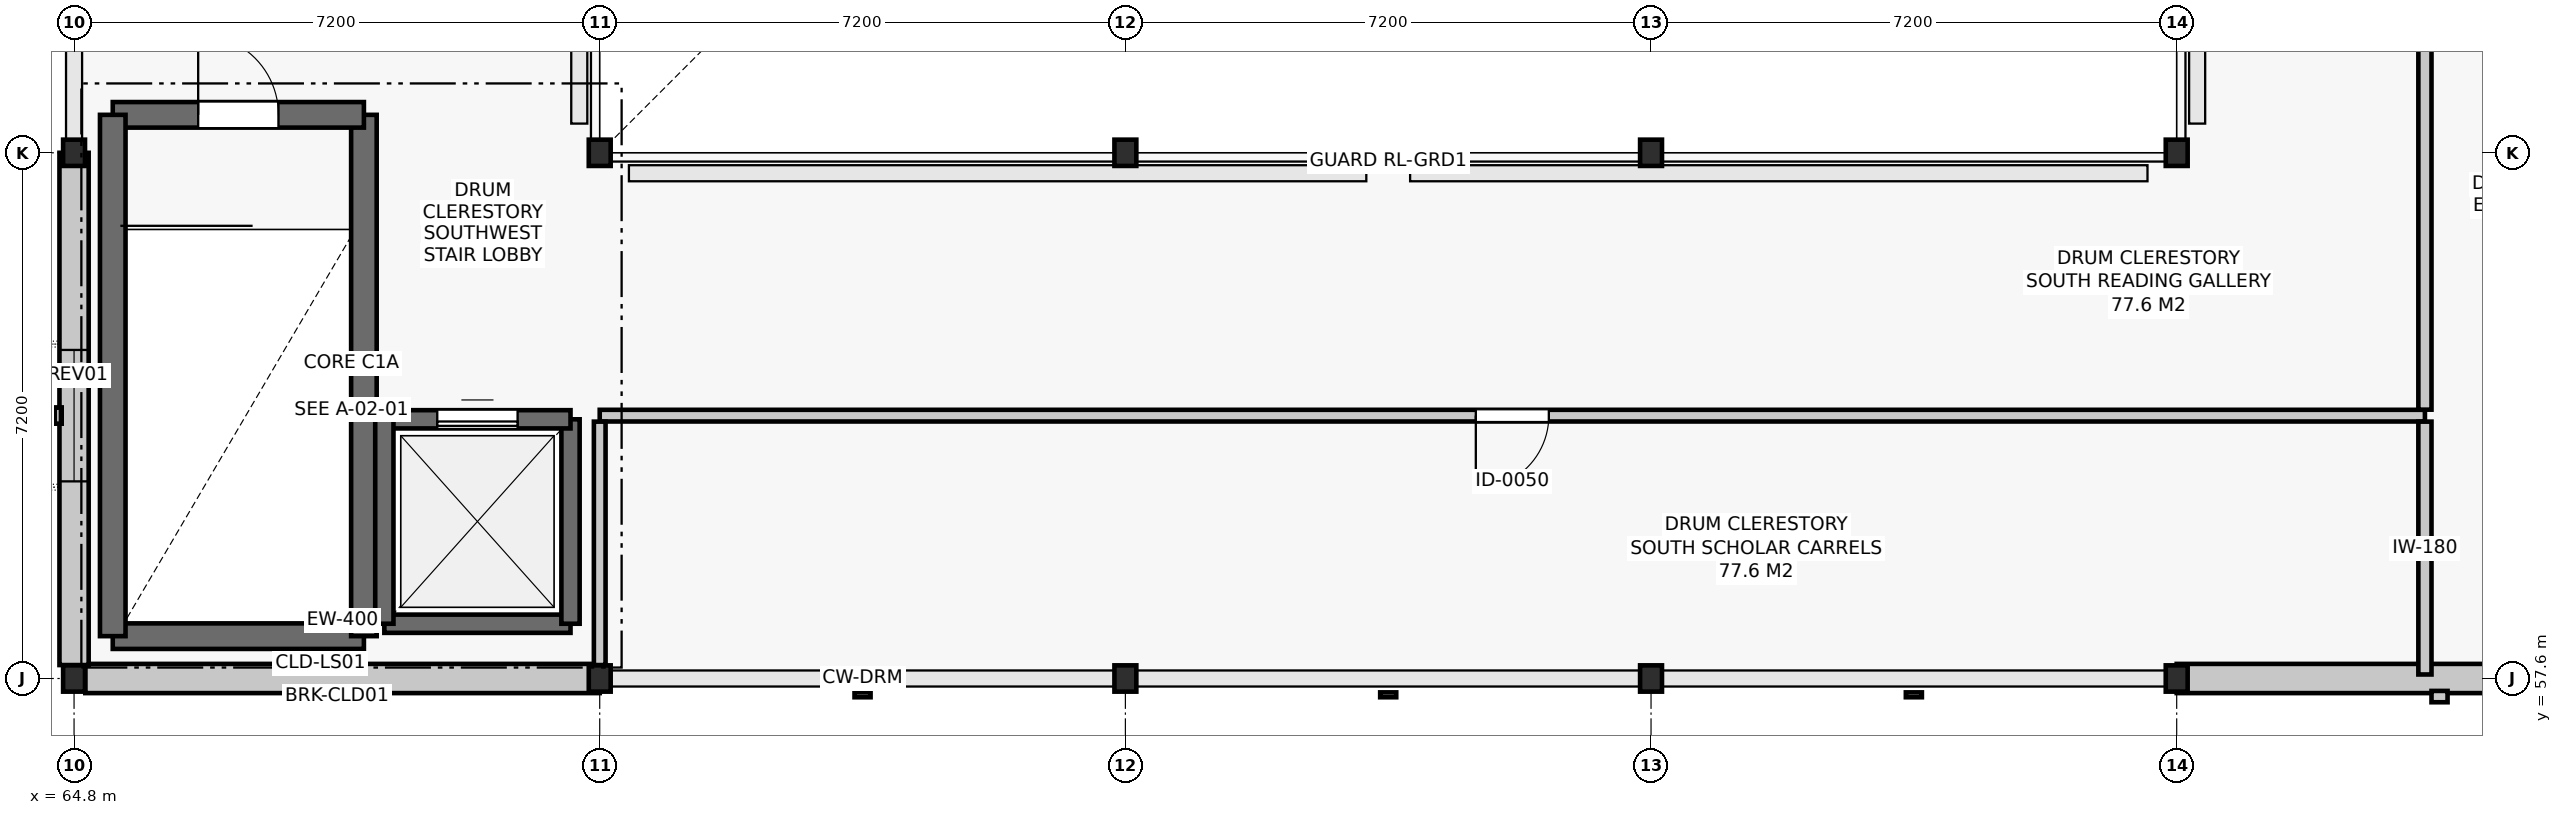
"""IFC4 building model, lengths in metres.
Left out: names, types, materials, properties, quantities, classifications, styles, units other than length and angle.
Written with IfcOpenShell. Run it as: python <this file> out.ifc"""

import sys

from ifc_helpers import new_model, si_unit, direction, frame, frame_2d, origin, origin_2d, place, context, subcontext, project, spatial, rectangle, i_section, extrude, element, fill, save


model = new_model("IFC4")
c1 = context("Model", 3, precision=1e-05, world=origin(), true_north=direction((0.0, 1.0)))
c2 = subcontext(c1, "Body", "Model", "MODEL_VIEW")
j1 = project(units=[si_unit("LENGTHUNIT", "METRE"), si_unit("PLANEANGLEUNIT", "RADIAN")], contexts=[c1])
p1 = place(None, origin())
s1 = spatial("IfcSite", under=j1, at=p1, CompositionType="ELEMENT")
p2 = place(p1, origin())
s2 = spatial("IfcBuilding", under=s1, at=p2, CompositionType="ELEMENT")
p3 = place(p2, frame((0.0, 0.0, 14.4)))
s3 = spatial("IfcBuildingStorey", under=s2, at=p3, CompositionType="ELEMENT", Elevation=14.4)
for number, where, z_axis, x_axis in (
    (1, (64.8, 57.6, 0.0), (0.0, 0.0, 1.0), (1.0, 0.0, 0.0)),
    (2, (64.8, 64.8, 0.0), (0.0, 0.0, 1.0), (1.0, 0.0, 0.0)),
    (3, (72.0, 57.6, 0.0), (0.0, 0.0, 1.0), (1.0, 0.0, 0.0)),
    (4, (72.0, 64.8, 0.0), (0.0, 0.0, 1.0), (1.0, 0.0, 0.0)),
    (5, (79.2, 57.6, 0.0), (0.0, 0.0, 1.0), (1.0, 0.0, 0.0)),
    (6, (79.2, 64.8, 0.0), (0.0, 0.0, 1.0), (1.0, 0.0, 0.0)),
    (7, (86.4, 57.6, 0.0), (0.0, 0.0, 1.0), (1.0, 0.0, 0.0)),
    (8, (86.4, 64.8, 0.0), (0.0, 0.0, 1.0), (1.0, 0.0, 0.0)),
    (9, (93.6, 57.6, 0.0), (0.0, 0.0, 1.0), (1.0, 0.0, 0.0)),
    (10, (93.6, 64.8, 0.0), (0.0, 0.0, 1.0), (1.0, 0.0, 0.0)),
):
    element("IfcColumn", number, at=place(p3, frame(where, z_axis=z_axis, x_axis=x_axis)), inside=s3, PredefinedType="COLUMN", context=c2, shape_type="SweptSolid", body=[
        extrude(i_section(OverallWidth=0.3, OverallDepth=0.36, WebThickness=0.012, FlangeThickness=0.022, FilletRadius=0.027, at=origin_2d()), origin(), (0.0, 0.0, 1.0), 4.2),
    ])
for number, where, z_axis, x_axis in (
    (11, (64.954, 57.6, 0.0), (0.0, 0.0, 1.0), (1.0, 0.0, 0.0)),
    (12, (93.6, 57.6, 0.0), (0.0, 0.0, 1.0), (1.0, 0.0, 0.0)),
):
    element("IfcWall", number, at=place(p3, frame(where, z_axis=z_axis, x_axis=x_axis)), inside=s3, PredefinedType="SOLIDWALL", context=c2, shape_type="SweptSolid", body=[
        extrude(rectangle(XDim=7.046, YDim=0.4, at=frame_2d((3.523, 0.0))), origin(), (0.0, 0.0, 1.0), 3.24),
    ])
p4 = place(p3, frame((64.8, 64.8, 0.0), z_axis=(0.0, 0.0, 1.0), x_axis=(0.0, -1.0, 0.0)))
e13 = element("IfcWall", 13, at=p4, inside=s3, PredefinedType="SOLIDWALL", context=c2, shape_type="SweptSolid", body=[
    extrude(rectangle(XDim=7.016, YDim=0.4, at=frame_2d((3.508, 0.0))), origin(), (0.0, 0.0, 1.0), 3.24),
])
p5 = place(p4, frame((2.7, 0.0, 0.95)))
e14 = element("IfcOpeningElement", 14, at=p5, cuts=e13, PredefinedType="OPENING", context=c2, shape_type="SweptSolid", body=[
    extrude(rectangle(XDim=1.8, YDim=2.05, at=frame_2d((0.9, 1.025))), frame((0.0, 0.212, 0.0), z_axis=(0.0, -1.0, 0.0), x_axis=(1.0, 0.0, 0.0)), (0.0, 0.0, 1.0), 0.424),
])
p6 = place(p3, frame((65.33, 58.18, 0.0), z_axis=(0.0, 0.0, 1.0), x_axis=(1.0, 0.0, 0.0)))
e15 = element("IfcWall", 15, at=p6, inside=s3, PredefinedType="SHEAR", context=c2, shape_type="SweptSolid", body=[
    extrude(rectangle(XDim=3.44, YDim=0.35, at=frame_2d((1.72, 0.0))), origin(), (0.0, 0.0, 1.0), 3.96),
])
p7 = place(p3, frame((68.77, 58.18, 0.0), z_axis=(0.0, 0.0, 1.0), x_axis=(0.0, 1.0, 0.0)))
e16 = element("IfcWall", 16, at=p7, inside=s3, PredefinedType="SHEAR", context=c2, shape_type="SweptSolid", body=[
    extrude(rectangle(XDim=7.14, YDim=0.35, at=frame_2d((3.57, 0.0))), origin(), (0.0, 0.0, 1.0), 3.96),
])
p8 = place(p3, frame((68.77, 65.32, 0.0), z_axis=(0.0, 0.0, 1.0), x_axis=(-1.0, 0.0, 0.0)))
e17 = element("IfcWall", 17, at=p8, inside=s3, PredefinedType="SHEAR", context=c2, shape_type="SweptSolid", body=[
    extrude(rectangle(XDim=3.44, YDim=0.35, at=frame_2d((1.72, 0.0))), origin(), (0.0, 0.0, 1.0), 3.96),
])
p9 = place(p8, frame((1.17, 0.0, 0.0)))
e18 = element("IfcOpeningElement", 18, at=p9, cuts=e17, PredefinedType="OPENING", context=c2, shape_type="SweptSolid", body=[
    extrude(rectangle(XDim=1.1, YDim=2.15, at=frame_2d((0.55, 1.075))), frame((0.0, 0.187, 0.0), z_axis=(0.0, -1.0, 0.0), x_axis=(1.0, 0.0, 0.0)), (0.0, 0.0, 1.0), 0.374),
])
p10 = place(p3, frame((65.33, 65.32, 0.0), z_axis=(0.0, 0.0, 1.0), x_axis=(0.0, -1.0, 0.0)))
e19 = element("IfcWall", 19, at=p10, inside=s3, PredefinedType="SHEAR", context=c2, shape_type="SweptSolid", body=[
    extrude(rectangle(XDim=7.14, YDim=0.35, at=frame_2d((3.57, 0.0))), origin(), (0.0, 0.0, 1.0), 3.96),
])
p11 = place(p3, frame((69.05, 58.35, 0.0), z_axis=(0.0, 0.0, 1.0), x_axis=(1.0, 0.0, 0.0)))
e20 = element("IfcWall", 20, at=p11, inside=s3, PredefinedType="SHEAR", context=c2, shape_type="SweptSolid", body=[
    extrude(rectangle(XDim=2.55, YDim=0.25, at=frame_2d((1.275, 0.0))), origin(), (0.0, 0.0, 1.0), 3.96),
])
p12 = place(p3, frame((71.6, 58.35, 0.0), z_axis=(0.0, 0.0, 1.0), x_axis=(0.0, 1.0, 0.0)))
e21 = element("IfcWall", 21, at=p12, inside=s3, PredefinedType="SHEAR", context=c2, shape_type="SweptSolid", body=[
    extrude(rectangle(XDim=2.8, YDim=0.25, at=frame_2d((1.4, 0.0))), origin(), (0.0, 0.0, 1.0), 3.96),
])
p13 = place(p3, frame((71.6, 61.15, 0.0), z_axis=(0.0, 0.0, 1.0), x_axis=(-1.0, 0.0, 0.0)))
e22 = element("IfcWall", 22, at=p13, inside=s3, PredefinedType="SHEAR", context=c2, shape_type="SweptSolid", body=[
    extrude(rectangle(XDim=2.55, YDim=0.25, at=frame_2d((1.275, 0.0))), origin(), (0.0, 0.0, 1.0), 3.96),
])
p14 = place(p13, frame((0.725, 0.0, 0.0)))
e23 = element("IfcOpeningElement", 23, at=p14, cuts=e22, PredefinedType="OPENING", context=c2, shape_type="SweptSolid", body=[
    extrude(rectangle(XDim=1.1, YDim=2.1, at=frame_2d((0.55, 1.05))), frame((0.0, 0.137, 0.0), z_axis=(0.0, -1.0, 0.0), x_axis=(1.0, 0.0, 0.0)), (0.0, 0.0, 1.0), 0.274),
])
p15 = place(p3, frame((69.05, 61.15, 0.0), z_axis=(0.0, 0.0, 1.0), x_axis=(0.0, -1.0, 0.0)))
e24 = element("IfcWall", 24, at=p15, inside=s3, PredefinedType="SHEAR", context=c2, shape_type="SweptSolid", body=[
    extrude(rectangle(XDim=2.8, YDim=0.25, at=frame_2d((1.4, 0.0))), origin(), (0.0, 0.0, 1.0), 3.96),
])
p16 = place(p3, frame((72.0, 61.2, 0.0), z_axis=(0.0, 0.0, 1.0), x_axis=(1.0, 0.0, 0.0)))
e25 = element("IfcWall", 25, at=p16, inside=s3, PredefinedType="PARTITIONING", context=c2, shape_type="SweptSolid", body=[
    extrude(rectangle(XDim=25.0, YDim=0.16, at=frame_2d((12.5, 0.0))), origin(), (0.0, 0.0, 1.0), 3.135),
])
p17 = place(p16, frame((12.0, 0.0, 0.0)))
e26 = element("IfcOpeningElement", 26, at=p17, cuts=e25, PredefinedType="OPENING", context=c2, shape_type="SweptSolid", body=[
    extrude(rectangle(XDim=1.0, YDim=2.15, at=frame_2d((0.5, 1.075))), frame((0.0, 0.092, 0.0), z_axis=(0.0, -1.0, 0.0), x_axis=(1.0, 0.0, 0.0)), (0.0, 0.0, 1.0), 0.184),
])
p18 = place(p3, frame((97.0, 57.655, 0.0), z_axis=(0.0, 0.0, 1.0), x_axis=(0.0, 1.0, 0.0)))
e27 = element("IfcWall", 27, at=p18, inside=s3, PredefinedType="PARTITIONING", context=c2, shape_type="SweptSolid", body=[
    extrude(rectangle(XDim=3.463, YDim=0.18, at=frame_2d((1.731, 0.0))), origin(), (0.0, 0.0, 1.0), 3.395),
])
p19 = place(p3, frame((97.0, 61.282, 0.0), z_axis=(0.0, 0.0, 1.0), x_axis=(0.0, 1.0, 0.0)))
e28 = element("IfcWall", 28, at=p19, inside=s3, PredefinedType="PARTITIONING", context=c2, shape_type="SweptSolid", body=[
    extrude(rectangle(XDim=17.826, YDim=0.18, at=frame_2d((8.913, 0.0))), origin(), (0.0, 0.0, 1.0), 3.585),
])
p20 = place(p19, frame((9.727, 0.0, 0.0)))
e29 = element("IfcOpeningElement", 29, at=p20, cuts=e28, PredefinedType="OPENING", context=c2, shape_type="SweptSolid", body=[
    extrude(rectangle(XDim=1.65, YDim=2.25, at=frame_2d((0.825, 1.125))), frame((0.0, 0.102, 0.0), z_axis=(0.0, -1.0, 0.0), x_axis=(1.0, 0.0, 0.0)), (0.0, 0.0, 1.0), 0.204),
])
p21 = place(p3, frame((72.0, 57.784, 0.0), z_axis=(0.0, 0.0, 1.0), x_axis=(0.0, 1.0, 0.0)))
e30 = element("IfcWall", 30, at=p21, inside=s3, PredefinedType="PARTITIONING", context=c2, shape_type="SweptSolid", body=[
    extrude(rectangle(XDim=3.334, YDim=0.16, at=frame_2d((1.667, 0.0))), origin(), (0.0, 0.0, 1.0), 3.595),
])
p22 = place(p5, origin())
e31 = element("IfcWindow", 31, at=p22, inside=s3, PartitioningType="SINGLE_PANEL", PredefinedType="WINDOW", context=c2, shape_type="SweptSolid", body=[
    extrude(rectangle(XDim=1.8, YDim=2.05, at=frame_2d((0.9, 1.025))), frame((0.0, 0.03, 0.0), z_axis=(0.0, -1.0, 0.0), x_axis=(1.0, 0.0, 0.0)), (0.0, 0.0, 1.0), 0.06),
])
fill(e14, e31)
p23 = place(p9, frame((1.1, 0.0, 0.0), z_axis=(0.0, 0.0, 1.0), x_axis=(-1.0, 0.0, 0.0)))
e32 = element("IfcDoor", 32, at=p23, inside=s3, OperationType="SINGLE_SWING_LEFT", PredefinedType="DOOR", context=c2, shape_type="SweptSolid", body=[
    extrude(rectangle(XDim=1.1, YDim=2.15, at=frame_2d((0.55, 1.075))), frame((0.0, 0.025, 0.0), z_axis=(0.0, -1.0, 0.0), x_axis=(1.0, 0.0, 0.0)), (0.0, 0.0, 1.0), 0.05),
])
fill(e18, e32)
p24 = place(p14, origin())
e33 = element("IfcDoor", 33, at=p24, inside=s3, OperationType="SLIDING_TO_LEFT", PredefinedType="DOOR", context=c2, shape_type="SweptSolid", body=[
    extrude(rectangle(XDim=1.1, YDim=2.1, at=frame_2d((0.55, 1.05))), frame((0.0, 0.025, 0.0), z_axis=(0.0, -1.0, 0.0), x_axis=(1.0, 0.0, 0.0)), (0.0, 0.0, 1.0), 0.05),
])
fill(e23, e33)
p25 = place(p17, frame((1.0, 0.0, 0.0), z_axis=(0.0, 0.0, 1.0), x_axis=(-1.0, 0.0, 0.0)))
e34 = element("IfcDoor", 34, at=p25, inside=s3, OperationType="SINGLE_SWING_RIGHT", PredefinedType="DOOR", context=c2, shape_type="SweptSolid", body=[
    extrude(rectangle(XDim=1.0, YDim=2.15, at=frame_2d((0.5, 1.075))), frame((0.0, 0.025, 0.0), z_axis=(0.0, -1.0, 0.0), x_axis=(1.0, 0.0, 0.0)), (0.0, 0.0, 1.0), 0.05),
])
fill(e26, e34)
save(model, sys.argv[1])
